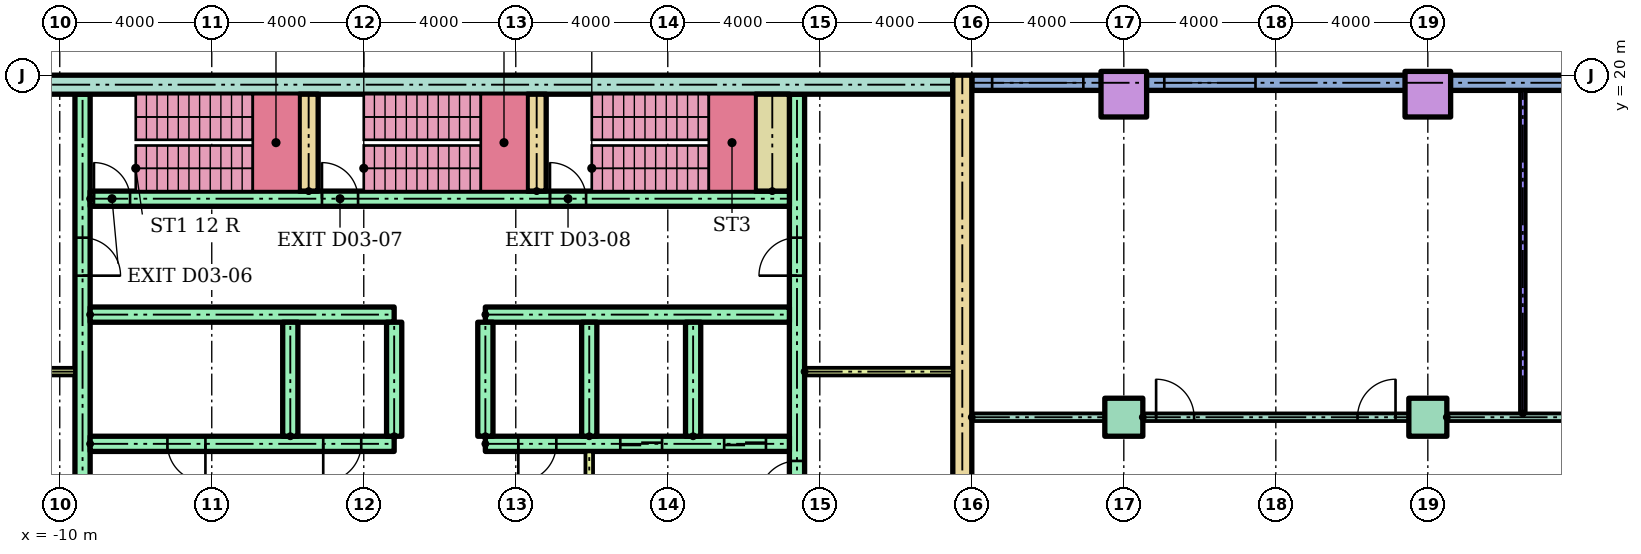
"""IFC4 building model, lengths in metres.
Left out: names, types, materials, properties, quantities, classifications, styles, units other than length and angle.
Written with IfcOpenShell. Run it as: python <this file> out.ifc"""

import sys

from ifc_helpers import new_model, si_unit, direction, frame, frame_2d, origin, origin_2d, place, context, subcontext, project, spatial, rectangle, hollow_rectangle, extrude, element, fill, save


model = new_model("IFC4")
c1 = context("Model", 3, precision=1e-05, world=origin(), true_north=direction((0.0, 1.0)))
c2 = subcontext(c1, "Body", "Model", "MODEL_VIEW")
j1 = project(units=[si_unit("LENGTHUNIT", "METRE"), si_unit("PLANEANGLEUNIT", "RADIAN")], contexts=[c1])
p1 = place(None, origin())
s1 = spatial("IfcSite", under=j1, at=p1, CompositionType="ELEMENT")
p2 = place(p1, origin())
s2 = spatial("IfcBuilding", under=s1, at=p2, CompositionType="ELEMENT")
p3 = place(p2, frame((0.0, 0.0, 14.0)))
s3 = spatial("IfcBuildingStorey", under=s2, at=p3, CompositionType="ELEMENT", Elevation=14.0)
for number, where in (
    (1, (18.0, 11.0, 0.0)),
    (2, (26.0, 11.0, 0.0)),
):
    element("IfcColumn", number, at=place(p3, frame(where)), inside=s3, PredefinedType="COLUMN", context=c2, shape_type="SweptSolid", body=[
        extrude(rectangle(XDim=1.0, YDim=1.0, at=origin_2d()), origin(), (0.0, 0.0, 1.0), 4.0),
    ])
for number, where in (
    (3, (18.0, 19.5, 0.0)),
    (4, (26.0, 19.5, 0.0)),
):
    element("IfcColumn", number, at=place(p3, frame(where)), inside=s3, PredefinedType="COLUMN", context=c2, shape_type="SweptSolid", body=[
        extrude(hollow_rectangle(XDim=1.2, YDim=1.2, WallThickness=0.06, at=origin_2d()), origin(), (0.0, 0.0, 1.0), 4.0),
    ])
p4 = place(p3, frame((39.6, 19.8, 0.0), z_axis=(0.0, 0.0, 1.0), x_axis=(-1.0, 0.0, 0.0)))
e5 = element("IfcWall", 5, at=p4, inside=s3, PredefinedType="STANDARD", context=c2, shape_type="SweptSolid", body=[
    extrude(rectangle(XDim=25.6, YDim=0.4, at=frame_2d((12.8, 0.0))), origin(), (0.0, 0.0, 1.0), 3.7),
])
p5 = place(p4, frame((2.4, 0.0, 0.9)))
e6 = element("IfcOpeningElement", 6, at=p5, cuts=e5, PredefinedType="OPENING", context=c2, shape_type="SweptSolid", body=[
    extrude(rectangle(XDim=2.4, YDim=2.1, at=frame_2d((1.2, 1.05))), frame((0.0, 0.21, 0.0), z_axis=(0.0, -1.0, 0.0), x_axis=(1.0, 0.0, 0.0)), (0.0, 0.0, 1.0), 0.42),
])
p6 = place(p4, frame((18.135, 0.0, 0.9)))
e7 = element("IfcOpeningElement", 7, at=p6, cuts=e5, PredefinedType="OPENING", context=c2, shape_type="SweptSolid", body=[
    extrude(rectangle(XDim=2.4, YDim=2.1, at=frame_2d((1.2, 1.05))), frame((0.0, 0.21, 0.0), z_axis=(0.0, -1.0, 0.0), x_axis=(1.0, 0.0, 0.0)), (0.0, 0.0, 1.0), 0.42),
])
p7 = place(p4, frame((22.665, 0.0, 0.9)))
e8 = element("IfcOpeningElement", 8, at=p7, cuts=e5, PredefinedType="OPENING", context=c2, shape_type="SweptSolid", body=[
    extrude(rectangle(XDim=2.4, YDim=2.1, at=frame_2d((1.2, 1.05))), frame((0.0, 0.21, 0.0), z_axis=(0.0, -1.0, 0.0), x_axis=(1.0, 0.0, 0.0)), (0.0, 0.0, 1.0), 0.42),
])
p8 = place(p3, frame((13.75, 3.0, 0.0), z_axis=(0.0, 0.0, 1.0), x_axis=(0.0, 1.0, 0.0)))
e9 = element("IfcWall", 9, at=p8, inside=s3, PredefinedType="SHEAR", context=c2, shape_type="SweptSolid", body=[
    extrude(rectangle(XDim=17.0, YDim=0.5, at=frame_2d((8.5, 0.0))), origin(), (0.0, 0.0, 1.0), 3.7),
])
p9 = place(p3, frame((-13.5, 19.75, 0.0)))
e10 = element("IfcWall", 10, at=p9, inside=s3, PredefinedType="SHEAR", context=c2, shape_type="SweptSolid", body=[
    extrude(rectangle(XDim=27.0, YDim=0.5, at=frame_2d((13.5, 0.0))), origin(), (0.0, 0.0, 1.0), 3.7),
])
p10 = place(p3, frame((-9.4, 6.8, 0.0), z_axis=(0.0, 0.0, 1.0), x_axis=(0.0, 1.0, 0.0)))
e11 = element("IfcWall", 11, at=p10, inside=s3, PredefinedType="SHEAR", context=c2, shape_type="SweptSolid", body=[
    extrude(rectangle(XDim=12.7, YDim=0.4, at=frame_2d((6.35, 0.0))), origin(), (0.0, 0.0, 1.0), 3.7),
])
p11 = place(p10, frame((1.15, 0.0, 0.0)))
e12 = element("IfcOpeningElement", 12, at=p11, cuts=e11, PredefinedType="OPENING", context=c2, shape_type="SweptSolid", body=[
    extrude(rectangle(XDim=1.0, YDim=2.1, at=frame_2d((0.5, 1.05))), frame((0.0, 0.21, 0.0), z_axis=(0.0, -1.0, 0.0), x_axis=(1.0, 0.0, 0.0)), (0.0, 0.0, 1.0), 0.42),
])
p12 = place(p10, frame((7.925, 0.0, 0.0)))
e13 = element("IfcOpeningElement", 13, at=p12, cuts=e11, PredefinedType="OPENING", context=c2, shape_type="SweptSolid", body=[
    extrude(rectangle(XDim=1.0, YDim=2.1, at=frame_2d((0.5, 1.05))), frame((0.0, 0.21, 0.0), z_axis=(0.0, -1.0, 0.0), x_axis=(1.0, 0.0, 0.0)), (0.0, 0.0, 1.0), 0.42),
])
p13 = place(p3, frame((9.4, 6.8, 0.0), z_axis=(0.0, 0.0, 1.0), x_axis=(0.0, 1.0, 0.0)))
e14 = element("IfcWall", 14, at=p13, inside=s3, PredefinedType="SHEAR", context=c2, shape_type="SweptSolid", body=[
    extrude(rectangle(XDim=12.7, YDim=0.4, at=frame_2d((6.35, 0.0))), origin(), (0.0, 0.0, 1.0), 3.7),
])
p14 = place(p13, frame((0.3, 0.0, 0.0)))
e15 = element("IfcOpeningElement", 15, at=p14, cuts=e14, PredefinedType="OPENING", context=c2, shape_type="SweptSolid", body=[
    extrude(rectangle(XDim=1.0, YDim=2.1, at=frame_2d((0.5, 1.05))), frame((0.0, 0.21, 0.0), z_axis=(0.0, -1.0, 0.0), x_axis=(1.0, 0.0, 0.0)), (0.0, 0.0, 1.0), 0.42),
])
p15 = place(p13, frame((2.05, 0.0, 0.0)))
e16 = element("IfcOpeningElement", 16, at=p15, cuts=e14, PredefinedType="OPENING", context=c2, shape_type="SweptSolid", body=[
    extrude(rectangle(XDim=1.0, YDim=2.1, at=frame_2d((0.5, 1.05))), frame((0.0, 0.21, 0.0), z_axis=(0.0, -1.0, 0.0), x_axis=(1.0, 0.0, 0.0)), (0.0, 0.0, 1.0), 0.42),
])
p16 = place(p13, frame((7.925, 0.0, 0.0)))
e17 = element("IfcOpeningElement", 17, at=p16, cuts=e14, PredefinedType="OPENING", context=c2, shape_type="SweptSolid", body=[
    extrude(rectangle(XDim=1.0, YDim=2.1, at=frame_2d((0.5, 1.05))), frame((0.0, 0.21, 0.0), z_axis=(0.0, -1.0, 0.0), x_axis=(1.0, 0.0, 0.0)), (0.0, 0.0, 1.0), 0.42),
])
p17 = place(p3, frame((-9.2, 10.3, 0.0)))
e18 = element("IfcWall", 18, at=p17, inside=s3, PredefinedType="SHEAR", context=c2, shape_type="SweptSolid", body=[
    extrude(rectangle(XDim=8.0, YDim=0.4, at=frame_2d((4.0, 0.0))), origin(), (0.0, 0.0, 1.0), 3.7),
])
p18 = place(p17, frame((2.033, 0.0, 0.0)))
e19 = element("IfcOpeningElement", 19, at=p18, cuts=e18, PredefinedType="OPENING", context=c2, shape_type="SweptSolid", body=[
    extrude(rectangle(XDim=1.0, YDim=2.1, at=frame_2d((0.5, 1.05))), frame((0.0, 0.21, 0.0), z_axis=(0.0, -1.0, 0.0), x_axis=(1.0, 0.0, 0.0)), (0.0, 0.0, 1.0), 0.42),
])
p19 = place(p17, frame((6.133, 0.0, 0.0)))
e20 = element("IfcOpeningElement", 20, at=p19, cuts=e18, PredefinedType="OPENING", context=c2, shape_type="SweptSolid", body=[
    extrude(rectangle(XDim=1.0, YDim=2.1, at=frame_2d((0.5, 1.05))), frame((0.0, 0.21, 0.0), z_axis=(0.0, -1.0, 0.0), x_axis=(1.0, 0.0, 0.0)), (0.0, 0.0, 1.0), 0.42),
])
p20 = place(p3, frame((-9.2, 13.7, 0.0)))
e21 = element("IfcWall", 21, at=p20, inside=s3, PredefinedType="SHEAR", context=c2, shape_type="SweptSolid", body=[
    extrude(rectangle(XDim=8.0, YDim=0.4, at=frame_2d((4.0, 0.0))), origin(), (0.0, 0.0, 1.0), 3.7),
])
p21 = place(p3, frame((1.2, 10.3, 0.0)))
e22 = element("IfcWall", 22, at=p21, inside=s3, PredefinedType="SHEAR", context=c2, shape_type="SweptSolid", body=[
    extrude(rectangle(XDim=8.0, YDim=0.4, at=frame_2d((4.0, 0.0))), origin(), (0.0, 0.0, 1.0), 3.7),
])
p22 = place(p21, frame((3.55, 0.0, 0.0)))
e23 = element("IfcOpeningElement", 23, at=p22, cuts=e22, PredefinedType="OPENING", context=c2, shape_type="SweptSolid", body=[
    extrude(rectangle(XDim=1.1, YDim=2.1, at=frame_2d((0.55, 1.05))), frame((0.0, 0.21, 0.0), z_axis=(0.0, -1.0, 0.0), x_axis=(1.0, 0.0, 0.0)), (0.0, 0.0, 1.0), 0.42),
])
p23 = place(p21, frame((6.283, 0.0, 0.0)))
e24 = element("IfcOpeningElement", 24, at=p23, cuts=e22, PredefinedType="OPENING", context=c2, shape_type="SweptSolid", body=[
    extrude(rectangle(XDim=1.1, YDim=2.1, at=frame_2d((0.55, 1.05))), frame((0.0, 0.21, 0.0), z_axis=(0.0, -1.0, 0.0), x_axis=(1.0, 0.0, 0.0)), (0.0, 0.0, 1.0), 0.42),
])
p24 = place(p21, frame((0.867, 0.0, 0.0)))
e25 = element("IfcOpeningElement", 25, at=p24, cuts=e22, PredefinedType="OPENING", context=c2, shape_type="SweptSolid", body=[
    extrude(rectangle(XDim=1.0, YDim=2.1, at=frame_2d((0.5, 1.05))), frame((0.0, 0.21, 0.0), z_axis=(0.0, -1.0, 0.0), x_axis=(1.0, 0.0, 0.0)), (0.0, 0.0, 1.0), 0.42),
])
p25 = place(p3, frame((1.2, 13.7, 0.0)))
e26 = element("IfcWall", 26, at=p25, inside=s3, PredefinedType="SHEAR", context=c2, shape_type="SweptSolid", body=[
    extrude(rectangle(XDim=8.0, YDim=0.4, at=frame_2d((4.0, 0.0))), origin(), (0.0, 0.0, 1.0), 3.7),
])
for number, where, z_axis, x_axis in (
    (27, (-3.933, 10.5, 0.0), (0.0, 0.0, 1.0), (0.0, 1.0, 0.0)),
    (28, (-1.2, 10.5, 0.0), (0.0, 0.0, 1.0), (0.0, 1.0, 0.0)),
    (29, (1.2, 10.5, 0.0), (0.0, 0.0, 1.0), (0.0, 1.0, 0.0)),
    (30, (3.933, 10.5, 0.0), (0.0, 0.0, 1.0), (0.0, 1.0, 0.0)),
    (31, (6.667, 10.5, 0.0), (0.0, 0.0, 1.0), (0.0, 1.0, 0.0)),
):
    element("IfcWall", number, at=place(p3, frame(where, z_axis=z_axis, x_axis=x_axis)), inside=s3, PredefinedType="SHEAR", context=c2, shape_type="SweptSolid", body=[
        extrude(rectangle(XDim=3.0, YDim=0.4, at=frame_2d((1.5, 0.0))), origin(), (0.0, 0.0, 1.0), 3.7),
    ])
p26 = place(p3, frame((3.933, 6.8, 0.0), z_axis=(0.0, 0.0, 1.0), x_axis=(0.0, 1.0, 0.0)))
e32 = element("IfcWall", 32, at=p26, inside=s3, PredefinedType="PARTITIONING", context=c2, shape_type="SweptSolid", body=[
    extrude(rectangle(XDim=3.3, YDim=0.2, at=frame_2d((1.65, 0.0))), origin(), (0.0, 0.0, 1.0), 3.7),
])
p27 = place(p26, frame((1.1, 0.0, 0.0)))
e33 = element("IfcOpeningElement", 33, at=p27, cuts=e32, PredefinedType="OPENING", context=c2, shape_type="SweptSolid", body=[
    extrude(rectangle(XDim=1.1, YDim=2.1, at=frame_2d((0.55, 1.05))), frame((0.0, 0.11, 0.0), z_axis=(0.0, -1.0, 0.0), x_axis=(1.0, 0.0, 0.0)), (0.0, 0.0, 1.0), 0.22),
])
p28 = place(p3, frame((-9.2, 16.75, 0.0)))
e34 = element("IfcWall", 34, at=p28, inside=s3, PredefinedType="SHEAR", context=c2, shape_type="SweptSolid", body=[
    extrude(rectangle(XDim=18.4, YDim=0.4, at=frame_2d((9.2, 0.0))), origin(), (0.0, 0.0, 1.0), 3.7),
])
p29 = place(p28, frame((0.1, 0.0, 0.0)))
e35 = element("IfcOpeningElement", 35, at=p29, cuts=e34, PredefinedType="OPENING", context=c2, shape_type="SweptSolid", body=[
    extrude(rectangle(XDim=0.95, YDim=2.1, at=frame_2d((0.475, 1.05))), frame((0.0, 0.21, 0.0), z_axis=(0.0, -1.0, 0.0), x_axis=(1.0, 0.0, 0.0)), (0.0, 0.0, 1.0), 0.42),
])
p30 = place(p28, frame((6.1, 0.0, 0.0)))
e36 = element("IfcOpeningElement", 36, at=p30, cuts=e34, PredefinedType="OPENING", context=c2, shape_type="SweptSolid", body=[
    extrude(rectangle(XDim=0.95, YDim=2.1, at=frame_2d((0.475, 1.05))), frame((0.0, 0.21, 0.0), z_axis=(0.0, -1.0, 0.0), x_axis=(1.0, 0.0, 0.0)), (0.0, 0.0, 1.0), 0.42),
])
p31 = place(p28, frame((12.1, 0.0, 0.0)))
e37 = element("IfcOpeningElement", 37, at=p31, cuts=e34, PredefinedType="OPENING", context=c2, shape_type="SweptSolid", body=[
    extrude(rectangle(XDim=0.95, YDim=2.1, at=frame_2d((0.475, 1.05))), frame((0.0, 0.21, 0.0), z_axis=(0.0, -1.0, 0.0), x_axis=(1.0, 0.0, 0.0)), (0.0, 0.0, 1.0), 0.42),
])
for number, where, z_axis, x_axis in (
    (38, (-3.45, 16.95, 0.0), (0.0, 0.0, 1.0), (0.0, 1.0, 0.0)),
    (39, (2.55, 16.95, 0.0), (0.0, 0.0, 1.0), (0.0, 1.0, 0.0)),
):
    element("IfcWall", number, at=place(p3, frame(where, z_axis=z_axis, x_axis=x_axis)), inside=s3, PredefinedType="SHEAR", context=c2, shape_type="SweptSolid", body=[
        extrude(rectangle(XDim=2.55, YDim=0.5, at=frame_2d((1.275, 0.0))), origin(), (0.0, 0.0, 1.0), 3.7),
    ])
p32 = place(p3, frame((8.75, 16.95, 0.0), z_axis=(0.0, 0.0, 1.0), x_axis=(0.0, 1.0, 0.0)))
e40 = element("IfcWall", 40, at=p32, inside=s3, PredefinedType="SHEAR", context=c2, shape_type="SweptSolid", body=[
    extrude(rectangle(XDim=2.55, YDim=0.9, at=frame_2d((1.275, 0.0))), origin(), (0.0, 0.0, 1.0), 3.7),
])
for number, where in (
    (41, (-13.5, 12.2, 0.0)),
    (42, (9.6, 12.2, 0.0)),
):
    element("IfcWall", number, at=place(p3, frame(where)), inside=s3, PredefinedType="PARTITIONING", context=c2, shape_type="SweptSolid", body=[
        extrude(rectangle(XDim=3.9, YDim=0.2, at=frame_2d((1.95, 0.0))), origin(), (0.0, 0.0, 1.0), 3.7),
    ])
p33 = place(p3, frame((14.0, 11.0, 0.0)))
e43 = element("IfcWall", 43, at=p33, inside=s3, PredefinedType="PARTITIONING", context=c2, shape_type="SweptSolid", body=[
    extrude(rectangle(XDim=3.5, YDim=0.2, at=frame_2d((1.75, 0.0))), origin(), (0.0, 0.0, 1.0), 3.7),
])
p34 = place(p3, frame((18.5, 11.0, 0.0)))
e44 = element("IfcWall", 44, at=p34, inside=s3, PredefinedType="PARTITIONING", context=c2, shape_type="SweptSolid", body=[
    extrude(rectangle(XDim=7.0, YDim=0.2, at=frame_2d((3.5, 0.0))), origin(), (0.0, 0.0, 1.0), 3.7),
])
p35 = place(p34, frame((0.35, 0.0, 0.0)))
e45 = element("IfcOpeningElement", 45, at=p35, cuts=e44, PredefinedType="OPENING", context=c2, shape_type="SweptSolid", body=[
    extrude(rectangle(XDim=1.0, YDim=2.1, at=frame_2d((0.5, 1.05))), frame((0.0, 0.11, 0.0), z_axis=(0.0, -1.0, 0.0), x_axis=(1.0, 0.0, 0.0)), (0.0, 0.0, 1.0), 0.22),
])
p36 = place(p34, frame((5.65, 0.0, 0.0)))
e46 = element("IfcOpeningElement", 46, at=p36, cuts=e44, PredefinedType="OPENING", context=c2, shape_type="SweptSolid", body=[
    extrude(rectangle(XDim=1.0, YDim=2.1, at=frame_2d((0.5, 1.05))), frame((0.0, 0.11, 0.0), z_axis=(0.0, -1.0, 0.0), x_axis=(1.0, 0.0, 0.0)), (0.0, 0.0, 1.0), 0.22),
])
p37 = place(p3, frame((26.5, 11.0, 0.0)))
e47 = element("IfcWall", 47, at=p37, inside=s3, PredefinedType="PARTITIONING", context=c2, shape_type="SweptSolid", body=[
    extrude(rectangle(XDim=7.0, YDim=0.2, at=frame_2d((3.5, 0.0))), origin(), (0.0, 0.0, 1.0), 3.7),
])
p38 = place(p37, frame((3.502, 0.0, 0.0)))
e48 = element("IfcOpeningElement", 48, at=p38, cuts=e47, PredefinedType="OPENING", context=c2, shape_type="SweptSolid", body=[
    extrude(rectangle(XDim=1.0, YDim=2.1, at=frame_2d((0.5, 1.05))), frame((0.0, 0.11, 0.0), z_axis=(0.0, -1.0, 0.0), x_axis=(1.0, 0.0, 0.0)), (0.0, 0.0, 1.0), 0.22),
])
p39 = place(p37, frame((5.65, 0.0, 0.0)))
e49 = element("IfcOpeningElement", 49, at=p39, cuts=e47, PredefinedType="OPENING", context=c2, shape_type="SweptSolid", body=[
    extrude(rectangle(XDim=1.0, YDim=2.1, at=frame_2d((0.5, 1.05))), frame((0.0, 0.11, 0.0), z_axis=(0.0, -1.0, 0.0), x_axis=(1.0, 0.0, 0.0)), (0.0, 0.0, 1.0), 0.22),
])
p40 = place(p3, frame((28.5, 11.1, 0.0), z_axis=(0.0, 0.0, 1.0), x_axis=(0.0, 1.0, 0.0)))
e50 = element("IfcWall", 50, at=p40, inside=s3, PredefinedType="PARTITIONING", context=c2, shape_type="SweptSolid", body=[
    extrude(rectangle(XDim=8.5, YDim=0.15, at=frame_2d((4.25, 0.0))), origin(), (0.0, 0.0, 1.0), 3.7),
])
p41 = place(p6, origin())
e51 = element("IfcWindow", 51, at=p41, inside=s3, PartitioningType="SINGLE_PANEL", PredefinedType="WINDOW", context=c2, shape_type="SweptSolid", body=[
    extrude(rectangle(XDim=2.4, YDim=2.1, at=frame_2d((1.2, 1.05))), frame((0.0, 0.03, 0.0), z_axis=(0.0, -1.0, 0.0), x_axis=(1.0, 0.0, 0.0)), (0.0, 0.0, 1.0), 0.06),
])
fill(e7, e51)
p42 = place(p7, origin())
e52 = element("IfcWindow", 52, at=p42, inside=s3, PartitioningType="SINGLE_PANEL", PredefinedType="WINDOW", context=c2, shape_type="SweptSolid", body=[
    extrude(rectangle(XDim=2.4, YDim=2.1, at=frame_2d((1.2, 1.05))), frame((0.0, 0.03, 0.0), z_axis=(0.0, -1.0, 0.0), x_axis=(1.0, 0.0, 0.0)), (0.0, 0.0, 1.0), 0.06),
])
fill(e8, e52)
p43 = place(p22, origin())
e53 = element("IfcDoor", 53, at=p43, inside=s3, OperationType="SLIDING_TO_LEFT", PredefinedType="DOOR", context=c2, shape_type="SweptSolid", body=[
    extrude(rectangle(XDim=1.1, YDim=2.1, at=frame_2d((0.55, 1.05))), frame((0.0, 0.025, 0.0), z_axis=(0.0, -1.0, 0.0), x_axis=(1.0, 0.0, 0.0)), (0.0, 0.0, 1.0), 0.05),
])
fill(e23, e53)
p44 = place(p23, origin())
e54 = element("IfcDoor", 54, at=p44, inside=s3, OperationType="SLIDING_TO_LEFT", PredefinedType="DOOR", context=c2, shape_type="SweptSolid", body=[
    extrude(rectangle(XDim=1.1, YDim=2.1, at=frame_2d((0.55, 1.05))), frame((0.0, 0.025, 0.0), z_axis=(0.0, -1.0, 0.0), x_axis=(1.0, 0.0, 0.0)), (0.0, 0.0, 1.0), 0.05),
])
fill(e24, e54)
p45 = place(p18, frame((1.0, 0.0, 0.0), z_axis=(0.0, 0.0, 1.0), x_axis=(-1.0, 0.0, 0.0)))
e55 = element("IfcDoor", 55, at=p45, inside=s3, OperationType="SINGLE_SWING_RIGHT", PredefinedType="DOOR", context=c2, shape_type="SweptSolid", body=[
    extrude(rectangle(XDim=1.0, YDim=2.1, at=frame_2d((0.5, 1.05))), frame((0.0, 0.025, 0.0), z_axis=(0.0, -1.0, 0.0), x_axis=(1.0, 0.0, 0.0)), (0.0, 0.0, 1.0), 0.05),
])
fill(e19, e55)
p46 = place(p19, frame((1.0, 0.0, 0.0), z_axis=(0.0, 0.0, 1.0), x_axis=(-1.0, 0.0, 0.0)))
e56 = element("IfcDoor", 56, at=p46, inside=s3, OperationType="SINGLE_SWING_LEFT", PredefinedType="DOOR", context=c2, shape_type="SweptSolid", body=[
    extrude(rectangle(XDim=1.0, YDim=2.1, at=frame_2d((0.5, 1.05))), frame((0.0, 0.025, 0.0), z_axis=(0.0, -1.0, 0.0), x_axis=(1.0, 0.0, 0.0)), (0.0, 0.0, 1.0), 0.05),
])
fill(e20, e56)
p47 = place(p24, frame((1.0, 0.0, 0.0), z_axis=(0.0, 0.0, 1.0), x_axis=(-1.0, 0.0, 0.0)))
e57 = element("IfcDoor", 57, at=p47, inside=s3, OperationType="SINGLE_SWING_LEFT", PredefinedType="DOOR", context=c2, shape_type="SweptSolid", body=[
    extrude(rectangle(XDim=1.0, YDim=2.1, at=frame_2d((0.5, 1.05))), frame((0.0, 0.025, 0.0), z_axis=(0.0, -1.0, 0.0), x_axis=(1.0, 0.0, 0.0)), (0.0, 0.0, 1.0), 0.05),
])
fill(e25, e57)
p48 = place(p29, origin())
e58 = element("IfcDoor", 58, at=p48, inside=s3, OperationType="SINGLE_SWING_LEFT", PredefinedType="DOOR", context=c2, shape_type="SweptSolid", body=[
    extrude(rectangle(XDim=0.95, YDim=2.1, at=frame_2d((0.475, 1.05))), frame((0.0, 0.025, 0.0), z_axis=(0.0, -1.0, 0.0), x_axis=(1.0, 0.0, 0.0)), (0.0, 0.0, 1.0), 0.05),
])
fill(e35, e58)
p49 = place(p30, origin())
e59 = element("IfcDoor", 59, at=p49, inside=s3, OperationType="SINGLE_SWING_LEFT", PredefinedType="DOOR", context=c2, shape_type="SweptSolid", body=[
    extrude(rectangle(XDim=0.95, YDim=2.1, at=frame_2d((0.475, 1.05))), frame((0.0, 0.025, 0.0), z_axis=(0.0, -1.0, 0.0), x_axis=(1.0, 0.0, 0.0)), (0.0, 0.0, 1.0), 0.05),
])
fill(e36, e59)
p50 = place(p31, origin())
e60 = element("IfcDoor", 60, at=p50, inside=s3, OperationType="SINGLE_SWING_LEFT", PredefinedType="DOOR", context=c2, shape_type="SweptSolid", body=[
    extrude(rectangle(XDim=0.95, YDim=2.1, at=frame_2d((0.475, 1.05))), frame((0.0, 0.025, 0.0), z_axis=(0.0, -1.0, 0.0), x_axis=(1.0, 0.0, 0.0)), (0.0, 0.0, 1.0), 0.05),
])
fill(e37, e60)
p51 = place(p12, frame((1.0, 0.0, 0.0), z_axis=(0.0, 0.0, 1.0), x_axis=(-1.0, 0.0, 0.0)))
e61 = element("IfcDoor", 61, at=p51, inside=s3, OperationType="SINGLE_SWING_LEFT", PredefinedType="DOOR", context=c2, shape_type="SweptSolid", body=[
    extrude(rectangle(XDim=1.0, YDim=2.1, at=frame_2d((0.5, 1.05))), frame((0.0, 0.025, 0.0), z_axis=(0.0, -1.0, 0.0), x_axis=(1.0, 0.0, 0.0)), (0.0, 0.0, 1.0), 0.05),
])
fill(e13, e61)
p52 = place(p15, origin())
e62 = element("IfcDoor", 62, at=p52, inside=s3, OperationType="SINGLE_SWING_LEFT", PredefinedType="DOOR", context=c2, shape_type="SweptSolid", body=[
    extrude(rectangle(XDim=1.0, YDim=2.1, at=frame_2d((0.5, 1.05))), frame((0.0, 0.025, 0.0), z_axis=(0.0, -1.0, 0.0), x_axis=(1.0, 0.0, 0.0)), (0.0, 0.0, 1.0), 0.05),
])
fill(e16, e62)
p53 = place(p16, origin())
e63 = element("IfcDoor", 63, at=p53, inside=s3, OperationType="SINGLE_SWING_LEFT", PredefinedType="DOOR", context=c2, shape_type="SweptSolid", body=[
    extrude(rectangle(XDim=1.0, YDim=2.1, at=frame_2d((0.5, 1.05))), frame((0.0, 0.025, 0.0), z_axis=(0.0, -1.0, 0.0), x_axis=(1.0, 0.0, 0.0)), (0.0, 0.0, 1.0), 0.05),
])
fill(e17, e63)
p54 = place(p35, origin())
e64 = element("IfcDoor", 64, at=p54, inside=s3, OperationType="SINGLE_SWING_LEFT", PredefinedType="DOOR", context=c2, shape_type="SweptSolid", body=[
    extrude(rectangle(XDim=1.0, YDim=2.1, at=frame_2d((0.5, 1.05))), frame((0.0, 0.025, 0.0), z_axis=(0.0, -1.0, 0.0), x_axis=(1.0, 0.0, 0.0)), (0.0, 0.0, 1.0), 0.05),
])
fill(e45, e64)
p55 = place(p36, origin())
e65 = element("IfcDoor", 65, at=p55, inside=s3, OperationType="SINGLE_SWING_RIGHT", PredefinedType="DOOR", context=c2, shape_type="SweptSolid", body=[
    extrude(rectangle(XDim=1.0, YDim=2.1, at=frame_2d((0.5, 1.05))), frame((0.0, 0.025, 0.0), z_axis=(0.0, -1.0, 0.0), x_axis=(1.0, 0.0, 0.0)), (0.0, 0.0, 1.0), 0.05),
])
fill(e46, e65)
save(model, sys.argv[1])
